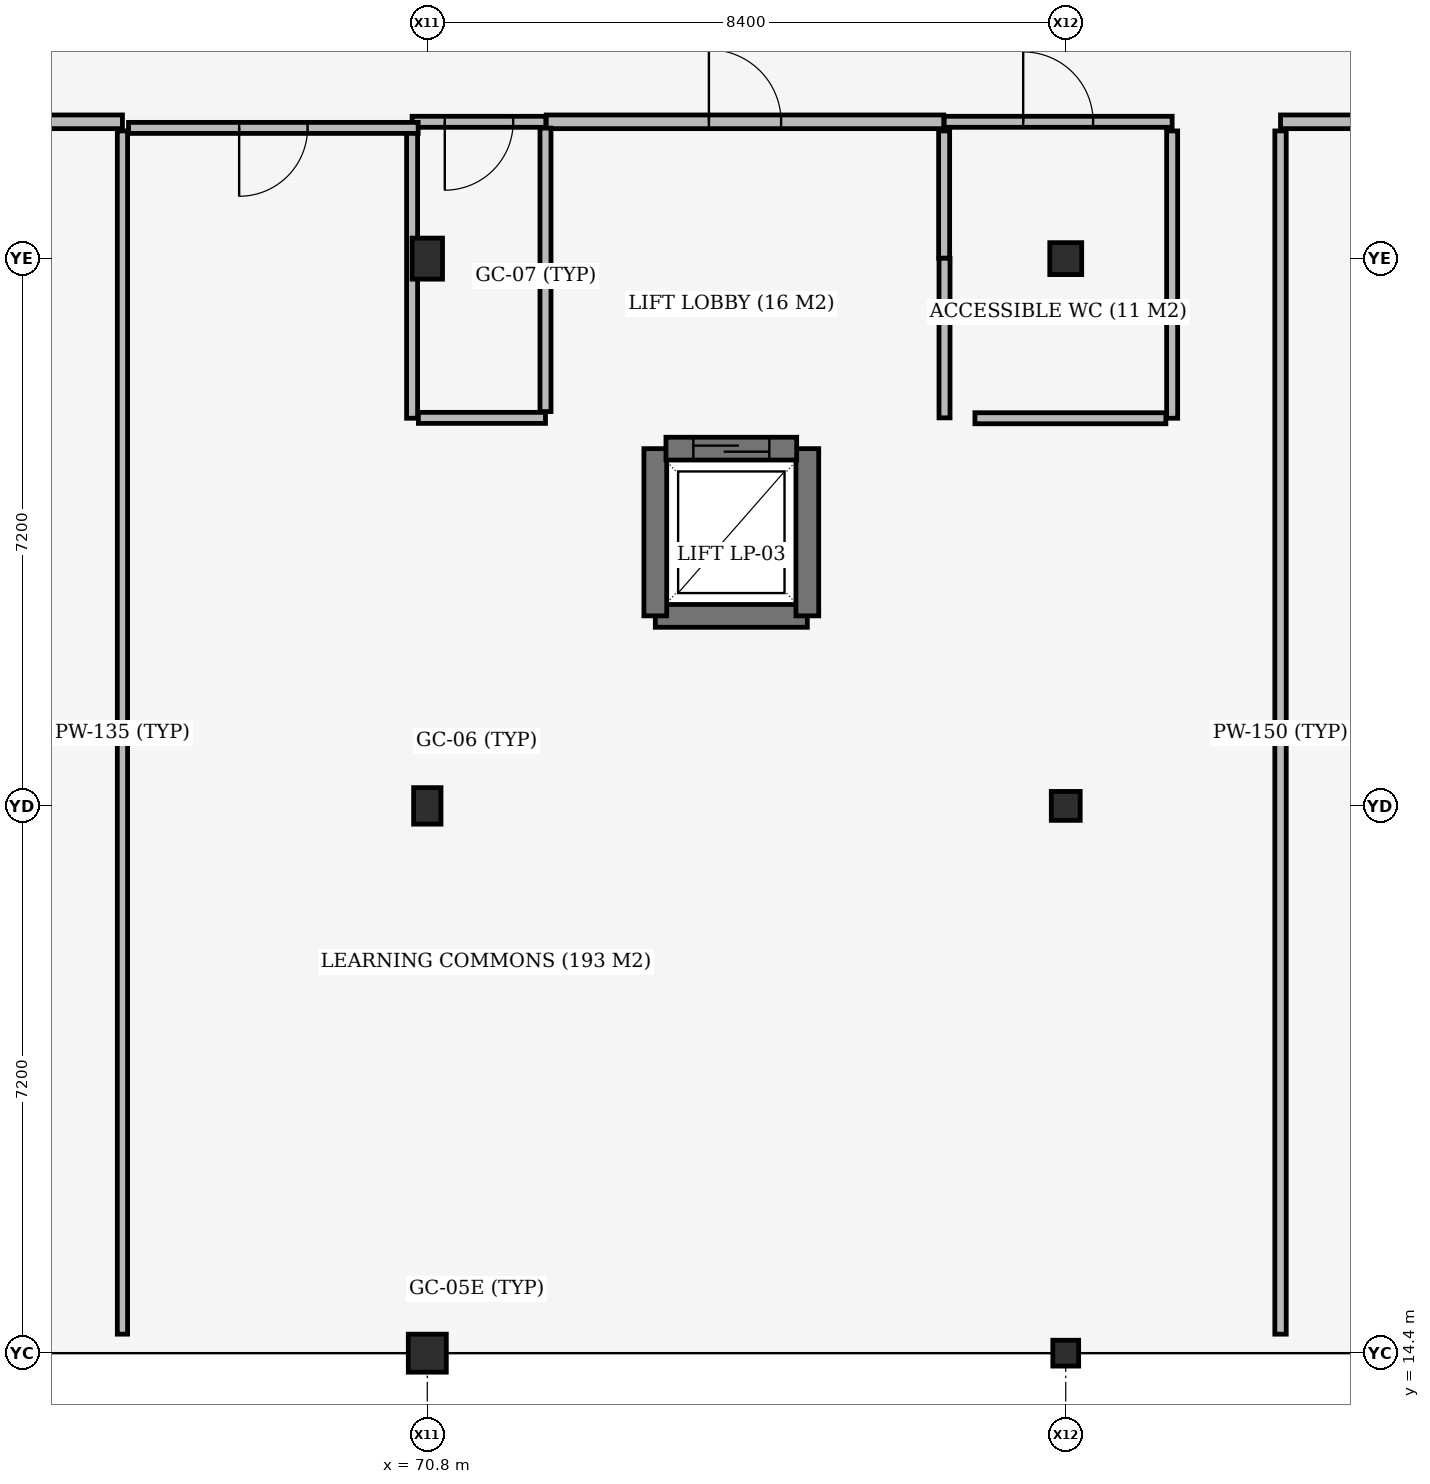
"""IFC4 building model, lengths in metres.
Left out: names, types, materials, properties, quantities, classifications, styles, units other than length and angle.
Written with IfcOpenShell. Run it as: python <this file> out.ifc"""

import sys

from ifc_helpers import new_model, si_unit, direction, frame, frame_2d, origin, origin_2d, place, context, subcontext, project, spatial, rectangle, extrude, element, fill, save


model = new_model("IFC4")
c1 = context("Model", 3, precision=1e-05, world=origin(), true_north=direction((0.0, 1.0)))
c2 = subcontext(c1, "Body", "Model", "MODEL_VIEW")
j1 = project(units=[si_unit("LENGTHUNIT", "METRE"), si_unit("PLANEANGLEUNIT", "RADIAN")], contexts=[c1])
p1 = place(None, origin())
s1 = spatial("IfcSite", under=j1, at=p1, CompositionType="ELEMENT")
p2 = place(p1, origin())
s2 = spatial("IfcBuilding", under=s1, at=p2, CompositionType="ELEMENT")
p3 = place(p2, frame((0.0, 0.0, 9.6)))
s3 = spatial("IfcBuildingStorey", under=s2, at=p3, CompositionType="ELEMENT", Elevation=9.6)
p4 = place(p3, frame((70.8, 14.4, 0.0), z_axis=(0.0, 0.0, 1.0), x_axis=(1.0, 0.0, 0.0)))
e1 = element("IfcColumn", 1, at=p4, inside=s3, PredefinedType="COLUMN", context=c2, shape_type="SweptSolid", body=[
    extrude(rectangle(XDim=0.5, YDim=0.5, at=origin_2d()), origin(), (0.0, 0.0, 1.0), 3.96),
])
p5 = place(p3, frame((70.8, 21.6, 0.0), z_axis=(0.0, 0.0, 1.0), x_axis=(1.0, 0.0, 0.0)))
e2 = element("IfcColumn", 2, at=p5, inside=s3, PredefinedType="COLUMN", context=c2, shape_type="SweptSolid", body=[
    extrude(rectangle(XDim=0.36, YDim=0.48, at=origin_2d()), origin(), (0.0, 0.0, 1.0), 3.935),
])
p6 = place(p3, frame((70.8, 28.8, 0.0), z_axis=(0.0, 0.0, 1.0), x_axis=(1.0, 0.0, 0.0)))
e3 = element("IfcColumn", 3, at=p6, inside=s3, PredefinedType="COLUMN", context=c2, shape_type="SweptSolid", body=[
    extrude(rectangle(XDim=0.4, YDim=0.54, at=origin_2d()), origin(), (0.0, 0.0, 1.0), 3.935),
])
p7 = place(p3, frame((79.2, 14.4, 0.0), z_axis=(0.0, 0.0, 1.0), x_axis=(1.0, 0.0, 0.0)))
e4 = element("IfcColumn", 4, at=p7, inside=s3, PredefinedType="COLUMN", context=c2, shape_type="SweptSolid", body=[
    extrude(rectangle(XDim=0.34, YDim=0.34, at=origin_2d()), origin(), (0.0, 0.0, 1.0), 3.96),
])
p8 = place(p3, frame((79.2, 21.6, 0.0), z_axis=(0.0, 0.0, 1.0), x_axis=(1.0, 0.0, 0.0)))
e5 = element("IfcColumn", 5, at=p8, inside=s3, PredefinedType="COLUMN", context=c2, shape_type="SweptSolid", body=[
    extrude(rectangle(XDim=0.38, YDim=0.38, at=origin_2d()), origin(), (0.0, 0.0, 1.0), 3.935),
])
p9 = place(p3, frame((79.2, 28.8, 0.0), z_axis=(0.0, 0.0, 1.0), x_axis=(1.0, 0.0, 0.0)))
e6 = element("IfcColumn", 6, at=p9, inside=s3, PredefinedType="COLUMN", context=c2, shape_type="SweptSolid", body=[
    extrude(rectangle(XDim=0.42, YDim=0.42, at=origin_2d()), origin(), (0.0, 0.0, 1.0), 3.935),
])
p10 = place(p3, frame((73.8, 24.1, 0.0), z_axis=(0.0, 0.0, 1.0), x_axis=(1.0, 0.0, 0.0)))
e7 = element("IfcWall", 7, at=p10, inside=s3, PredefinedType="SHEAR", context=c2, shape_type="SweptSolid", body=[
    extrude(rectangle(XDim=2.0, YDim=0.3, at=frame_2d((1.0, 0.0))), origin(), (0.0, 0.0, 1.0), 3.935),
])
for number, where, z_axis, x_axis in (
    (8, (73.8, 26.3, 0.0), (0.0, 0.0, 1.0), (0.0, -1.0, 0.0)),
    (9, (75.8, 24.1, 0.0), (0.0, 0.0, 1.0), (0.0, 1.0, 0.0)),
):
    element("IfcWall", number, at=place(p3, frame(where, z_axis=z_axis, x_axis=x_axis)), inside=s3, PredefinedType="SHEAR", context=c2, shape_type="SweptSolid", body=[
        extrude(rectangle(XDim=2.2, YDim=0.3, at=frame_2d((1.1, 0.0))), origin(), (0.0, 0.0, 1.0), 3.935),
    ])
p11 = place(p3, frame((73.94, 26.3, 0.0), z_axis=(0.0, 0.0, 1.0), x_axis=(1.0, 0.0, 0.0)))
e10 = element("IfcWall", 10, at=p11, inside=s3, PredefinedType="SHEAR", context=c2, shape_type="SweptSolid", body=[
    extrude(rectangle(XDim=1.72, YDim=0.3, at=frame_2d((0.86, 0.0))), origin(), (0.0, 0.0, 1.0), 3.935),
])
p12 = place(p11, frame((0.36, 0.0, 0.0)))
e11 = element("IfcOpeningElement", 11, at=p12, cuts=e10, PredefinedType="OPENING", context=c2, shape_type="SweptSolid", body=[
    extrude(rectangle(XDim=1.0, YDim=2.1, at=frame_2d((0.5, 1.05))), frame((0.0, 0.16, 0.0), z_axis=(0.0, -1.0, 0.0), x_axis=(1.0, 0.0, 0.0)), (0.0, 0.0, 1.0), 0.32),
])
p13 = place(p3, frame((70.6, 30.6, 0.0), z_axis=(0.0, 0.0, 1.0), x_axis=(1.0, 0.0, 0.0)))
e12 = element("IfcWall", 12, at=p13, inside=s3, PredefinedType="PLUMBINGWALL", context=c2, shape_type="SweptSolid", body=[
    extrude(rectangle(XDim=1.76, YDim=0.145, at=frame_2d((0.88, 0.0))), origin(), (0.0, 0.0, 1.0), 3.415),
])
p14 = place(p13, frame((0.43, 0.0, 0.0)))
e13 = element("IfcOpeningElement", 13, at=p14, cuts=e12, PredefinedType="OPENING", context=c2, shape_type="SweptSolid", body=[
    extrude(rectangle(XDim=0.9, YDim=2.1, at=frame_2d((0.45, 1.05))), frame((0.0, 0.083, 0.0), z_axis=(0.0, -1.0, 0.0), x_axis=(1.0, 0.0, 0.0)), (0.0, 0.0, 1.0), 0.165),
])
p15 = place(p3, frame((70.6, 26.7, 0.0), z_axis=(0.0, 0.0, 1.0), x_axis=(0.0, 1.0, 0.0)))
e14 = element("IfcWall", 14, at=p15, inside=s3, PredefinedType="PLUMBINGWALL", context=c2, shape_type="SweptSolid", body=[
    extrude(rectangle(XDim=3.78, YDim=0.145, at=frame_2d((1.89, 0.0))), origin(), (0.0, 0.0, 1.0), 3.195),
])
p16 = place(p3, frame((77.6, 30.6, 0.0), z_axis=(0.0, 0.0, 1.0), x_axis=(1.0, 0.0, 0.0)))
e15 = element("IfcWall", 15, at=p16, inside=s3, PredefinedType="PLUMBINGWALL", context=c2, shape_type="SweptSolid", body=[
    extrude(rectangle(XDim=3.0, YDim=0.145, at=frame_2d((1.5, 0.0))), origin(), (0.0, 0.0, 1.0), 3.295),
])
p17 = place(p16, frame((1.04, 0.0, 0.0)))
e16 = element("IfcOpeningElement", 16, at=p17, cuts=e15, PredefinedType="OPENING", context=c2, shape_type="SweptSolid", body=[
    extrude(rectangle(XDim=0.92, YDim=2.1, at=frame_2d((0.46, 1.05))), frame((0.0, 0.083, 0.0), z_axis=(0.0, -1.0, 0.0), x_axis=(1.0, 0.0, 0.0)), (0.0, 0.0, 1.0), 0.165),
])
p18 = place(p3, frame((77.6, 28.805, 0.0), z_axis=(0.0, 0.0, 1.0), x_axis=(0.0, 1.0, 0.0)))
e17 = element("IfcWall", 17, at=p18, inside=s3, PredefinedType="PLUMBINGWALL", context=c2, shape_type="SweptSolid", body=[
    extrude(rectangle(XDim=1.675, YDim=0.145, at=frame_2d((0.837, 0.0))), origin(), (0.0, 0.0, 1.0), 3.295),
])
p19 = place(p3, frame((80.6, 26.7, 0.0), z_axis=(0.0, 0.0, 1.0), x_axis=(0.0, 1.0, 0.0)))
e18 = element("IfcWall", 18, at=p19, inside=s3, PredefinedType="PLUMBINGWALL", context=c2, shape_type="SweptSolid", body=[
    extrude(rectangle(XDim=3.78, YDim=0.145, at=frame_2d((1.89, 0.0))), origin(), (0.0, 0.0, 1.0), 3.935),
])
p20 = place(p3, frame((78.005, 26.7, 0.0), z_axis=(0.0, 0.0, 1.0), x_axis=(1.0, 0.0, 0.0)))
e19 = element("IfcWall", 19, at=p20, inside=s3, PredefinedType="PLUMBINGWALL", context=c2, shape_type="SweptSolid", body=[
    extrude(rectangle(XDim=2.513, YDim=0.145, at=frame_2d((1.256, 0.0))), origin(), (0.0, 0.0, 1.0), 3.355),
])
p21 = place(p3, frame((54.3, 30.6, 0.0), z_axis=(0.0, 0.0, 1.0), x_axis=(1.0, 0.0, 0.0)))
e20 = element("IfcWall", 20, at=p21, inside=s3, PredefinedType="PARTITIONING", context=c2, shape_type="SweptSolid", body=[
    extrude(rectangle(XDim=12.489, YDim=0.18, at=frame_2d((6.245, 0.0))), origin(), (0.0, 0.0, 1.0), 3.255),
])
p22 = place(p21, frame((5.764, 0.0, 0.0)))
e21 = element("IfcOpeningElement", 21, at=p22, cuts=e20, PredefinedType="OPENING", context=c2, shape_type="SweptSolid", body=[
    extrude(rectangle(XDim=0.96, YDim=2.15, at=frame_2d((0.48, 1.075))), frame((0.0, 0.1, 0.0), z_axis=(0.0, -1.0, 0.0), x_axis=(1.0, 0.0, 0.0)), (0.0, 0.0, 1.0), 0.2),
])
p23 = place(p3, frame((66.789, 14.65, 0.0), z_axis=(0.0, 0.0, 1.0), x_axis=(0.0, 1.0, 0.0)))
e22 = element("IfcWall", 22, at=p23, inside=s3, PredefinedType="PARTITIONING", context=c2, shape_type="SweptSolid", body=[
    extrude(rectangle(XDim=15.83, YDim=0.135, at=frame_2d((7.915, 0.0))), origin(), (0.0, 0.0, 1.0), 3.255),
])
p24 = place(p3, frame((72.365, 30.6, 0.0), z_axis=(0.0, 0.0, 1.0), x_axis=(1.0, 0.0, 0.0)))
e23 = element("IfcWall", 23, at=p24, inside=s3, PredefinedType="PARTITIONING", context=c2, shape_type="SweptSolid", body=[
    extrude(rectangle(XDim=5.23, YDim=0.18, at=frame_2d((2.615, 0.0))), origin(), (0.0, 0.0, 1.0), 3.635),
])
p25 = place(p24, frame((2.14, 0.0, 0.0)))
e24 = element("IfcOpeningElement", 24, at=p25, cuts=e23, PredefinedType="OPENING", context=c2, shape_type="SweptSolid", body=[
    extrude(rectangle(XDim=0.95, YDim=2.15, at=frame_2d((0.475, 1.075))), frame((0.0, 0.1, 0.0), z_axis=(0.0, -1.0, 0.0), x_axis=(1.0, 0.0, 0.0)), (0.0, 0.0, 1.0), 0.2),
])
p26 = place(p3, frame((82.026, 14.65, 0.0), z_axis=(0.0, 0.0, 1.0), x_axis=(0.0, 1.0, 0.0)))
e25 = element("IfcWall", 25, at=p26, inside=s3, PredefinedType="PARTITIONING", context=c2, shape_type="SweptSolid", body=[
    extrude(rectangle(XDim=15.83, YDim=0.15, at=frame_2d((7.915, 0.0))), origin(), (0.0, 0.0, 1.0), 3.935),
])
p27 = place(p3, frame((82.026, 30.6, 0.0), z_axis=(0.0, 0.0, 1.0), x_axis=(1.0, 0.0, 0.0)))
e26 = element("IfcWall", 26, at=p27, inside=s3, PredefinedType="PARTITIONING", context=c2, shape_type="SweptSolid", body=[
    extrude(rectangle(XDim=17.985, YDim=0.18, at=frame_2d((8.993, 0.0))), origin(), (0.0, 0.0, 1.0), 3.935),
])
p28 = place(p27, frame((8.512, 0.0, 0.0)))
e27 = element("IfcOpeningElement", 27, at=p28, cuts=e26, PredefinedType="OPENING", context=c2, shape_type="SweptSolid", body=[
    extrude(rectangle(XDim=0.96, YDim=2.15, at=frame_2d((0.48, 1.075))), frame((0.0, 0.1, 0.0), z_axis=(0.0, -1.0, 0.0), x_axis=(1.0, 0.0, 0.0)), (0.0, 0.0, 1.0), 0.2),
])
p29 = place(p3, frame((66.869, 30.52, 0.0), z_axis=(0.0, 0.0, 1.0), x_axis=(1.0, 0.0, 0.0)))
e28 = element("IfcWall", 28, at=p29, inside=s3, PredefinedType="PLUMBINGWALL", context=c2, shape_type="SweptSolid", body=[
    extrude(rectangle(XDim=3.811, YDim=0.145, at=frame_2d((1.906, 0.0))), origin(), (0.0, 0.0, 1.0), 3.415),
])
p30 = place(p29, frame((1.456, 0.0, 0.0)))
e29 = element("IfcOpeningElement", 29, at=p30, cuts=e28, PredefinedType="OPENING", context=c2, shape_type="SweptSolid", body=[
    extrude(rectangle(XDim=0.9, YDim=2.1, at=frame_2d((0.45, 1.05))), frame((0.0, 0.083, 0.0), z_axis=(0.0, -1.0, 0.0), x_axis=(1.0, 0.0, 0.0)), (0.0, 0.0, 1.0), 0.165),
])
p31 = place(p3, frame((70.683, 26.705, 0.0), z_axis=(0.0, 0.0, 1.0), x_axis=(1.0, 0.0, 0.0)))
e30 = element("IfcWall", 30, at=p31, inside=s3, PredefinedType="PLUMBINGWALL", context=c2, shape_type="SweptSolid", body=[
    extrude(rectangle(XDim=1.672, YDim=0.145, at=frame_2d((0.836, 0.0))), origin(), (0.0, 0.0, 1.0), 3.195),
])
p32 = place(p3, frame((72.355, 26.788, 0.0), z_axis=(0.0, 0.0, 1.0), x_axis=(0.0, 1.0, 0.0)))
e31 = element("IfcWall", 31, at=p32, inside=s3, PredefinedType="PLUMBINGWALL", context=c2, shape_type="SweptSolid", body=[
    extrude(rectangle(XDim=3.73, YDim=0.145, at=frame_2d((1.865, 0.0))), origin(), (0.0, 0.0, 1.0), 3.295),
])
p33 = place(p3, frame((77.605, 26.705, 0.0), z_axis=(0.0, 0.0, 1.0), x_axis=(0.0, 1.0, 0.0)))
e32 = element("IfcWall", 32, at=p33, inside=s3, PredefinedType="PLUMBINGWALL", context=c2, shape_type="SweptSolid", body=[
    extrude(rectangle(XDim=2.1, YDim=0.145, at=frame_2d((1.05, 0.0))), origin(), (0.0, 0.0, 1.0), 3.295),
])
p34 = place(p12, origin())
e33 = element("IfcDoor", 33, at=p34, inside=s3, OperationType="SLIDING_TO_LEFT", PredefinedType="DOOR", context=c2, shape_type="SweptSolid", body=[
    extrude(rectangle(XDim=1.0, YDim=2.1, at=frame_2d((0.5, 1.05))), frame((0.0, 0.025, 0.0), z_axis=(0.0, -1.0, 0.0), x_axis=(1.0, 0.0, 0.0)), (0.0, 0.0, 1.0), 0.05),
])
fill(e11, e33)
p35 = place(p14, origin())
e34 = element("IfcDoor", 34, at=p35, inside=s3, OperationType="SINGLE_SWING_RIGHT", PredefinedType="DOOR", context=c2, shape_type="SweptSolid", body=[
    extrude(rectangle(XDim=0.9, YDim=2.1, at=frame_2d((0.45, 1.05))), frame((0.0, 0.025, 0.0), z_axis=(0.0, -1.0, 0.0), x_axis=(1.0, 0.0, 0.0)), (0.0, 0.0, 1.0), 0.05),
])
fill(e13, e34)
p36 = place(p17, origin())
e35 = element("IfcDoor", 35, at=p36, inside=s3, OperationType="SINGLE_SWING_LEFT", PredefinedType="DOOR", context=c2, shape_type="SweptSolid", body=[
    extrude(rectangle(XDim=0.92, YDim=2.1, at=frame_2d((0.46, 1.05))), frame((0.0, 0.025, 0.0), z_axis=(0.0, -1.0, 0.0), x_axis=(1.0, 0.0, 0.0)), (0.0, 0.0, 1.0), 0.05),
])
fill(e16, e35)
p37 = place(p25, origin())
e36 = element("IfcDoor", 36, at=p37, inside=s3, OperationType="SINGLE_SWING_LEFT", PredefinedType="DOOR", context=c2, shape_type="SweptSolid", body=[
    extrude(rectangle(XDim=0.95, YDim=2.15, at=frame_2d((0.475, 1.075))), frame((0.0, 0.025, 0.0), z_axis=(0.0, -1.0, 0.0), x_axis=(1.0, 0.0, 0.0)), (0.0, 0.0, 1.0), 0.05),
])
fill(e24, e36)
p38 = place(p30, origin())
e37 = element("IfcDoor", 37, at=p38, inside=s3, OperationType="SINGLE_SWING_RIGHT", PredefinedType="DOOR", context=c2, shape_type="SweptSolid", body=[
    extrude(rectangle(XDim=0.9, YDim=2.1, at=frame_2d((0.45, 1.05))), frame((0.0, 0.025, 0.0), z_axis=(0.0, -1.0, 0.0), x_axis=(1.0, 0.0, 0.0)), (0.0, 0.0, 1.0), 0.05),
])
fill(e29, e37)
save(model, sys.argv[1])
